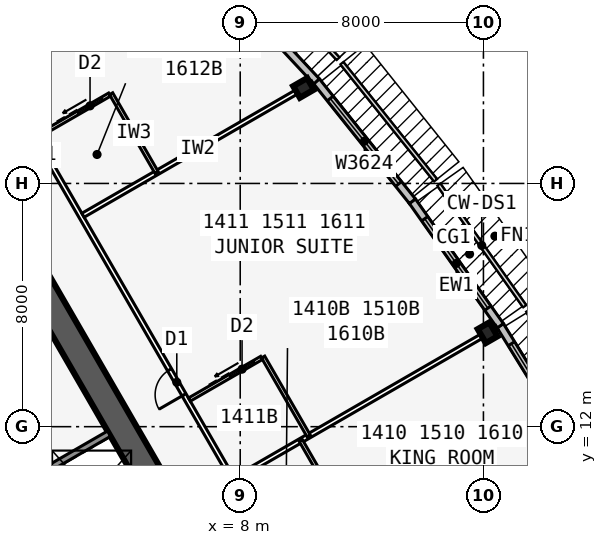
"""IFC4 building model, lengths in metres.
Left out: names, types, materials, properties, quantities, classifications, styles, units other than length and angle.
Written with IfcOpenShell. Run it as: python <this file> out.ifc"""

import sys

from ifc_helpers import new_model, si_unit, direction, frame, frame_2d, origin, origin_2d, place, context, subcontext, project, spatial, rectangle, i_section, extrude, element, fill, save


model = new_model("IFC4")
c1 = context("Model", 3, precision=1e-05, world=origin(), true_north=direction((0.0, 1.0)))
c2 = subcontext(c1, "Body", "Model", "MODEL_VIEW")
j1 = project(units=[si_unit("LENGTHUNIT", "METRE"), si_unit("PLANEANGLEUNIT", "RADIAN")], contexts=[c1])
p1 = place(None, origin())
s1 = spatial("IfcSite", under=j1, at=p1, CompositionType="ELEMENT")
p2 = place(p1, origin())
s2 = spatial("IfcBuilding", under=s1, at=p2, CompositionType="ELEMENT")
p3 = place(p2, frame((0.0, 0.0, 59.1)))
s3 = spatial("IfcBuildingStorey", under=s2, at=p3, CompositionType="ELEMENT", Elevation=59.1)
p4 = place(p3, frame((16.5, -9.526, 0.0), z_axis=(0.0, 0.0, 1.0), x_axis=(-0.499999749417, 0.866025548458, 0.0)))
e1 = element("IfcWall", 1, at=p4, inside=s3, PredefinedType="SHEAR", context=c2, shape_type="SweptSolid", body=[
    extrude(rectangle(XDim=33.0, YDim=0.9, at=frame_2d((16.5, 0.0))), origin(), (0.0, 0.0, 1.0), 3.4),
])
p5 = place(p4, frame((14.15, 0.0, 0.0)))
e2 = element("IfcOpeningElement", 2, at=p5, cuts=e1, PredefinedType="OPENING", context=c2, shape_type="SweptSolid", body=[
    extrude(rectangle(XDim=1.8, YDim=2.13, at=frame_2d((0.9, 1.065))), frame((0.0, 0.46, 0.0), z_axis=(0.0, -1.0, 0.0), x_axis=(1.0, 0.0, 0.0)), (0.0, 0.0, 1.0), 0.92),
])
p6 = place(p4, frame((12.6, 0.0, 0.0)))
e3 = element("IfcOpeningElement", 3, at=p6, cuts=e1, PredefinedType="OPENING", context=c2, shape_type="SweptSolid", body=[
    extrude(rectangle(XDim=1.0, YDim=2.13, at=frame_2d((0.5, 1.065))), frame((0.0, 0.46, 0.0), z_axis=(0.0, -1.0, 0.0), x_axis=(1.0, 0.0, 0.0)), (0.0, 0.0, 1.0), 0.92),
])
p7 = place(p3, frame((5.379, 2.586, 0.0), z_axis=(0.0, 0.0, 1.0), x_axis=(-0.500001375892, 0.866024609411, 0.0)))
e4 = element("IfcWall", 4, at=p7, inside=s3, PredefinedType="SOLIDWALL", context=c2, shape_type="SweptSolid", body=[
    extrude(rectangle(XDim=10.633, YDim=0.25, at=frame_2d((5.316, 0.0))), origin(), (0.0, 0.0, 1.0), 3.235),
])
p8 = place(p7, frame((9.164, 0.0, 0.0)))
e5 = element("IfcOpeningElement", 5, at=p8, cuts=e4, PredefinedType="OPENING", context=c2, shape_type="SweptSolid", body=[
    extrude(rectangle(XDim=0.9, YDim=2.13, at=frame_2d((0.45, 1.065))), frame((0.0, 0.135, 0.0), z_axis=(0.0, -1.0, 0.0), x_axis=(1.0, 0.0, 0.0)), (0.0, 0.0, 1.0), 0.27),
])
p9 = place(p7, frame((1.0, 0.0, 0.0)))
e6 = element("IfcOpeningElement", 6, at=p9, cuts=e4, PredefinedType="OPENING", context=c2, shape_type="SweptSolid", body=[
    extrude(rectangle(XDim=1.1, YDim=2.13, at=frame_2d((0.55, 1.065))), frame((0.0, 0.135, 0.0), z_axis=(0.0, -1.0, 0.0), x_axis=(1.0, 0.0, 0.0)), (0.0, 0.0, 1.0), 0.27),
])
p10 = place(p7, frame((3.9, 0.0, 0.0)))
e7 = element("IfcOpeningElement", 7, at=p10, cuts=e4, PredefinedType="OPENING", context=c2, shape_type="SweptSolid", body=[
    extrude(rectangle(XDim=1.1, YDim=2.13, at=frame_2d((0.55, 1.065))), frame((0.0, 0.135, 0.0), z_axis=(0.0, -1.0, 0.0), x_axis=(1.0, 0.0, 0.0)), (0.0, 0.0, 1.0), 0.27),
])
p11 = place(p7, frame((6.8, 0.0, 0.0)))
e8 = element("IfcOpeningElement", 8, at=p11, cuts=e4, PredefinedType="OPENING", context=c2, shape_type="SweptSolid", body=[
    extrude(rectangle(XDim=1.1, YDim=2.13, at=frame_2d((0.55, 1.065))), frame((0.0, 0.135, 0.0), z_axis=(0.0, -1.0, 0.0), x_axis=(1.0, 0.0, 0.0)), (0.0, 0.0, 1.0), 0.27),
])
p12 = place(p3, frame((0.979, 10.207, 0.0), z_axis=(0.0, 0.0, 1.0), x_axis=(0.866022959057, 0.500004234368, 0.0)))
e9 = element("IfcWall", 9, at=p12, inside=s3, PredefinedType="SOLIDWALL", context=c2, shape_type="SweptSolid", body=[
    extrude(rectangle(XDim=3.125, YDim=0.2, at=frame_2d((1.562, 0.0))), origin(), (0.0, 0.0, 1.0), 3.235),
])
for number, where, z_axis, x_axis in (
    (10, (16.137, 15.09, 0.0), (0.0, 0.0, 1.0), (0.866, 0.5, 0.0)),
    (11, (10.083, 23.142, 0.0), (0.0, 0.0, 1.0), (-0.5, 0.866, 0.0)),
):
    element("IfcColumn", number, at=place(p3, frame(where, z_axis=z_axis, x_axis=x_axis)), inside=s3, PredefinedType="COLUMN", context=c2, shape_type="SweptSolid", body=[
        extrude(i_section(OverallWidth=0.442, OverallDepth=0.531, WebThickness=0.066, FlangeThickness=0.106, at=origin_2d()), origin(), (0.0, 0.0, 1.0), 3.4),
    ])
p13 = place(p3, frame((19.182, 11.071, 0.0), z_axis=(0.0, 0.0, 1.0), x_axis=(-0.526132807704, 0.850402415717, 0.0)))
e12 = element("IfcWall", 12, at=p13, inside=s3, PredefinedType="STANDARD", context=c2, shape_type="SweptSolid", body=[
    extrude(rectangle(XDim=5.002, YDim=0.25, at=frame_2d((2.501, 0.0))), origin(), (0.0, 0.0, 1.0), 3.235),
])
p14 = place(p13, frame((0.701, 0.0, 0.45)))
e13 = element("IfcOpeningElement", 13, at=p14, cuts=e12, PredefinedType="OPENING", context=c2, shape_type="SweptSolid", body=[
    extrude(rectangle(XDim=3.6, YDim=2.4, at=frame_2d((1.8, 1.2))), frame((0.0, 0.135, 0.0), z_axis=(0.0, -1.0, 0.0), x_axis=(1.0, 0.0, 0.0)), (0.0, 0.0, 1.0), 0.27),
])
p15 = place(p3, frame((16.555, 15.318, 0.0), z_axis=(0.0, 0.0, 1.0), x_axis=(-0.5766431066, 0.81699616132, 0.0)))
e14 = element("IfcWall", 14, at=p15, inside=s3, PredefinedType="STANDARD", context=c2, shape_type="SweptSolid", body=[
    extrude(rectangle(XDim=5.021, YDim=0.25, at=frame_2d((2.51, 0.0))), origin(), (0.0, 0.0, 1.0), 3.235),
])
p16 = place(p15, frame((0.71, 0.0, 0.45)))
e15 = element("IfcOpeningElement", 15, at=p16, cuts=e14, PredefinedType="OPENING", context=c2, shape_type="SweptSolid", body=[
    extrude(rectangle(XDim=3.6, YDim=2.4, at=frame_2d((1.8, 1.2))), frame((0.0, 0.135, 0.0), z_axis=(0.0, -1.0, 0.0), x_axis=(1.0, 0.0, 0.0)), (0.0, 0.0, 1.0), 0.27),
])
p17 = place(p3, frame((13.664, 19.414, 0.0), z_axis=(0.0, 0.0, 1.0), x_axis=(-0.624594965756, 0.780948864364, 0.0)))
e16 = element("IfcWall", 16, at=p17, inside=s3, PredefinedType="STANDARD", context=c2, shape_type="SweptSolid", body=[
    extrude(rectangle(XDim=5.058, YDim=0.25, at=frame_2d((2.529, 0.0))), origin(), (0.0, 0.0, 1.0), 3.235),
])
p18 = place(p17, frame((0.729, 0.0, 0.45)))
e17 = element("IfcOpeningElement", 17, at=p18, cuts=e16, PredefinedType="OPENING", context=c2, shape_type="SweptSolid", body=[
    extrude(rectangle(XDim=3.6, YDim=2.4, at=frame_2d((1.8, 1.2))), frame((0.0, 0.135, 0.0), z_axis=(0.0, -1.0, 0.0), x_axis=(1.0, 0.0, 0.0)), (0.0, 0.0, 1.0), 0.27),
])
p19 = place(p3, frame((10.511, 23.357, 0.0), z_axis=(0.0, 0.0, 1.0), x_axis=(-0.682289646561, 0.731081964075, 0.0)))
e18 = element("IfcWall", 18, at=p19, inside=s3, PredefinedType="STANDARD", context=c2, shape_type="SweptSolid", body=[
    extrude(rectangle(XDim=8.211, YDim=0.25, at=frame_2d((4.105, 0.0))), origin(), (0.0, 0.0, 1.0), 3.235),
])
p20 = place(p19, frame((2.006, 0.0, 0.45)))
e19 = element("IfcOpeningElement", 19, at=p20, cuts=e18, PredefinedType="OPENING", context=c2, shape_type="SweptSolid", body=[
    extrude(rectangle(XDim=4.2, YDim=2.4, at=frame_2d((2.1, 1.2))), frame((0.0, 0.135, 0.0), z_axis=(0.0, -1.0, 0.0), x_axis=(1.0, 0.0, 0.0)), (0.0, 0.0, 1.0), 0.27),
])
p21 = place(p3, frame((20.027, -10.985, 0.0), z_axis=(0.0, 0.0, 1.0), x_axis=(-0.500001677587, 0.866024435227, 0.0)))
e20 = element("IfcWall", 20, at=p21, inside=s3, PredefinedType="PARTITIONING", context=c2, shape_type="SweptSolid", body=[
    extrude(rectangle(XDim=39.054, YDim=0.15, at=frame_2d((19.527, 0.0))), origin(), (0.0, 0.0, 1.0), 3.235),
])
p22 = place(p21, frame((0.352, 0.0, 0.0)))
e21 = element("IfcOpeningElement", 21, at=p22, cuts=e20, PredefinedType="OPENING", context=c2, shape_type="SweptSolid", body=[
    extrude(rectangle(XDim=0.95, YDim=2.13, at=frame_2d((0.475, 1.065))), frame((0.0, 0.085, 0.0), z_axis=(0.0, -1.0, 0.0), x_axis=(1.0, 0.0, 0.0)), (0.0, 0.0, 1.0), 0.17),
])
p23 = place(p21, frame((10.352, 0.0, 0.0)))
e22 = element("IfcOpeningElement", 22, at=p23, cuts=e20, PredefinedType="OPENING", context=c2, shape_type="SweptSolid", body=[
    extrude(rectangle(XDim=0.95, YDim=2.13, at=frame_2d((0.475, 1.065))), frame((0.0, 0.085, 0.0), z_axis=(0.0, -1.0, 0.0), x_axis=(1.0, 0.0, 0.0)), (0.0, 0.0, 1.0), 0.17),
])
p24 = place(p21, frame((17.152, 0.0, 0.0)))
e23 = element("IfcOpeningElement", 23, at=p24, cuts=e20, PredefinedType="OPENING", context=c2, shape_type="SweptSolid", body=[
    extrude(rectangle(XDim=0.95, YDim=2.13, at=frame_2d((0.475, 1.065))), frame((0.0, 0.085, 0.0), z_axis=(0.0, -1.0, 0.0), x_axis=(1.0, 0.0, 0.0)), (0.0, 0.0, 1.0), 0.17),
])
p25 = place(p21, frame((20.952, 0.0, 0.0)))
e24 = element("IfcOpeningElement", 24, at=p25, cuts=e20, PredefinedType="OPENING", context=c2, shape_type="SweptSolid", body=[
    extrude(rectangle(XDim=0.95, YDim=2.13, at=frame_2d((0.475, 1.065))), frame((0.0, 0.085, 0.0), z_axis=(0.0, -1.0, 0.0), x_axis=(1.0, 0.0, 0.0)), (0.0, 0.0, 1.0), 0.17),
])
p26 = place(p21, frame((27.752, 0.0, 0.0)))
e25 = element("IfcOpeningElement", 25, at=p26, cuts=e20, PredefinedType="OPENING", context=c2, shape_type="SweptSolid", body=[
    extrude(rectangle(XDim=0.95, YDim=2.13, at=frame_2d((0.475, 1.065))), frame((0.0, 0.085, 0.0), z_axis=(0.0, -1.0, 0.0), x_axis=(1.0, 0.0, 0.0)), (0.0, 0.0, 1.0), 0.17),
])
p27 = place(p21, frame((37.752, 0.0, 0.0)))
e26 = element("IfcOpeningElement", 26, at=p27, cuts=e20, PredefinedType="OPENING", context=c2, shape_type="SweptSolid", body=[
    extrude(rectangle(XDim=0.95, YDim=2.13, at=frame_2d((0.475, 1.065))), frame((0.0, 0.085, 0.0), z_axis=(0.0, -1.0, 0.0), x_axis=(1.0, 0.0, 0.0)), (0.0, 0.0, 1.0), 0.17),
])
p28 = place(p3, frame((10.329, 5.963, 0.0), z_axis=(0.0, 0.0, 1.0), x_axis=(0.866021688545, 0.500006434927, 0.0)))
e27 = element("IfcWall", 27, at=p28, inside=s3, PredefinedType="PARTITIONING", context=c2, shape_type="SweptSolid", body=[
    extrude(rectangle(XDim=10.096, YDim=0.15, at=frame_2d((5.048, 0.0))), origin(), (0.0, 0.0, 1.0), 2.389),
])
p29 = place(p3, frame((7.829, 10.293, 0.0), z_axis=(0.0, 0.0, 1.0), x_axis=(0.866016302457, 0.50001576363, 0.0)))
e28 = element("IfcWall", 28, at=p29, inside=s3, PredefinedType="PARTITIONING", context=c2, shape_type="SweptSolid", body=[
    extrude(rectangle(XDim=9.943, YDim=0.15, at=frame_2d((4.972, 0.0))), origin(), (0.0, 0.0, 1.0), 2.389),
])
p30 = place(p3, frame((2.829, 18.954, 0.0), z_axis=(0.0, 0.0, 1.0), x_axis=(0.866020536561, 0.500008430184, 0.0)))
e29 = element("IfcWall", 29, at=p30, inside=s3, PredefinedType="PARTITIONING", context=c2, shape_type="SweptSolid", body=[
    extrude(rectangle(XDim=8.72, YDim=0.15, at=frame_2d((4.36, 0.0))), origin(), (0.0, 0.0, 1.0), 2.389),
])
p31 = place(p3, frame((11.194, 9.465, 0.0), z_axis=(0.0, 0.0, 1.0), x_axis=(-0.500077600433, 0.865980596518, 0.0)))
e30 = element("IfcWall", 30, at=p31, inside=s3, PredefinedType="PLUMBINGWALL", context=c2, shape_type="SweptSolid", body=[
    extrude(rectangle(XDim=2.4, YDim=0.12, at=frame_2d((1.2, 0.0))), origin(), (0.0, 0.0, 1.0), 3.235),
])
p32 = place(p3, frame((10.253, 11.693, 0.0), z_axis=(0.0, 0.0, 1.0), x_axis=(-0.50002537861, 0.866010750942, 0.0)))
e31 = element("IfcWall", 31, at=p32, inside=s3, PredefinedType="PLUMBINGWALL", context=c2, shape_type="SweptSolid", body=[
    extrude(rectangle(XDim=3.0, YDim=0.12, at=frame_2d((1.5, 0.0))), origin(), (0.0, 0.0, 1.0), 3.235),
])
p33 = place(p3, frame((6.329, 12.891, 0.0), z_axis=(0.0, 0.0, 1.0), x_axis=(0.866035715982, 0.499982138324, 0.0)))
e32 = element("IfcWall", 32, at=p33, inside=s3, PredefinedType="PLUMBINGWALL", context=c2, shape_type="SweptSolid", body=[
    extrude(rectangle(XDim=2.74, YDim=0.12, at=frame_2d((1.37, 0.0))), origin(), (0.0, 0.0, 1.0), 3.235),
])
p34 = place(p33, frame((1.55, 0.0, 0.0)))
e33 = element("IfcOpeningElement", 33, at=p34, cuts=e32, PredefinedType="OPENING", context=c2, shape_type="SweptSolid", body=[
    extrude(rectangle(XDim=0.9, YDim=2.13, at=frame_2d((0.45, 1.065))), frame((0.0, 0.07, 0.0), z_axis=(0.0, -1.0, 0.0), x_axis=(1.0, 0.0, 0.0)), (0.0, 0.0, 1.0), 0.14),
])
p35 = place(p3, frame((5.253, 20.354, 0.0), z_axis=(0.0, 0.0, 1.0), x_axis=(-0.499990139034, 0.866031096941, 0.0)))
e34 = element("IfcWall", 34, at=p35, inside=s3, PredefinedType="PLUMBINGWALL", context=c2, shape_type="SweptSolid", body=[
    extrude(rectangle(XDim=3.0, YDim=0.12, at=frame_2d((1.5, 0.0))), origin(), (0.0, 0.0, 1.0), 3.235),
])
p36 = place(p3, frame((1.329, 21.552, 0.0), z_axis=(0.0, 0.0, 1.0), x_axis=(0.865997131366, 0.500048966069, 0.0)))
e35 = element("IfcWall", 35, at=p36, inside=s3, PredefinedType="PLUMBINGWALL", context=c2, shape_type="SweptSolid", body=[
    extrude(rectangle(XDim=2.74, YDim=0.12, at=frame_2d((1.37, 0.0))), origin(), (0.0, 0.0, 1.0), 3.235),
])
p37 = place(p36, frame((1.55, 0.0, 0.0)))
e36 = element("IfcOpeningElement", 36, at=p37, cuts=e35, PredefinedType="OPENING", context=c2, shape_type="SweptSolid", body=[
    extrude(rectangle(XDim=0.9, YDim=2.13, at=frame_2d((0.45, 1.065))), frame((0.0, 0.07, 0.0), z_axis=(0.0, -1.0, 0.0), x_axis=(1.0, 0.0, 0.0)), (0.0, 0.0, 1.0), 0.14),
])
p38 = place(p14, origin())
e37 = element("IfcWindow", 37, at=p38, inside=s3, PartitioningType="SINGLE_PANEL", PredefinedType="WINDOW", context=c2, shape_type="SweptSolid", body=[
    extrude(rectangle(XDim=3.6, YDim=2.4, at=frame_2d((1.8, 1.2))), frame((0.0, 0.03, 0.0), z_axis=(0.0, -1.0, 0.0), x_axis=(1.0, 0.0, 0.0)), (0.0, 0.0, 1.0), 0.06),
])
fill(e13, e37)
p39 = place(p16, origin())
e38 = element("IfcWindow", 38, at=p39, inside=s3, PartitioningType="SINGLE_PANEL", PredefinedType="WINDOW", context=c2, shape_type="SweptSolid", body=[
    extrude(rectangle(XDim=3.6, YDim=2.4, at=frame_2d((1.8, 1.2))), frame((0.0, 0.03, 0.0), z_axis=(0.0, -1.0, 0.0), x_axis=(1.0, 0.0, 0.0)), (0.0, 0.0, 1.0), 0.06),
])
fill(e15, e38)
p40 = place(p18, origin())
e39 = element("IfcWindow", 39, at=p40, inside=s3, PartitioningType="SINGLE_PANEL", PredefinedType="WINDOW", context=c2, shape_type="SweptSolid", body=[
    extrude(rectangle(XDim=3.6, YDim=2.4, at=frame_2d((1.8, 1.2))), frame((0.0, 0.03, 0.0), z_axis=(0.0, -1.0, 0.0), x_axis=(1.0, 0.0, 0.0)), (0.0, 0.0, 1.0), 0.06),
])
fill(e17, e39)
p41 = place(p34, origin())
e40 = element("IfcDoor", 40, at=p41, inside=s3, OperationType="SLIDING_TO_LEFT", PredefinedType="DOOR", context=c2, shape_type="SweptSolid", body=[
    extrude(rectangle(XDim=0.9, YDim=2.13, at=frame_2d((0.45, 1.065))), frame((0.0, 0.025, 0.0), z_axis=(0.0, -1.0, 0.0), x_axis=(1.0, 0.0, 0.0)), (0.0, 0.0, 1.0), 0.05),
])
fill(e33, e40)
p42 = place(p26, origin())
e41 = element("IfcDoor", 41, at=p42, inside=s3, OperationType="SINGLE_SWING_LEFT", PredefinedType="DOOR", context=c2, shape_type="SweptSolid", body=[
    extrude(rectangle(XDim=0.95, YDim=2.13, at=frame_2d((0.475, 1.065))), frame((0.0, 0.025, 0.0), z_axis=(0.0, -1.0, 0.0), x_axis=(1.0, 0.0, 0.0)), (0.0, 0.0, 1.0), 0.05),
])
fill(e25, e41)
p43 = place(p37, origin())
e42 = element("IfcDoor", 42, at=p43, inside=s3, OperationType="SLIDING_TO_LEFT", PredefinedType="DOOR", context=c2, shape_type="SweptSolid", body=[
    extrude(rectangle(XDim=0.9, YDim=2.13, at=frame_2d((0.45, 1.065))), frame((0.0, 0.025, 0.0), z_axis=(0.0, -1.0, 0.0), x_axis=(1.0, 0.0, 0.0)), (0.0, 0.0, 1.0), 0.05),
])
fill(e36, e42)
save(model, sys.argv[1])
